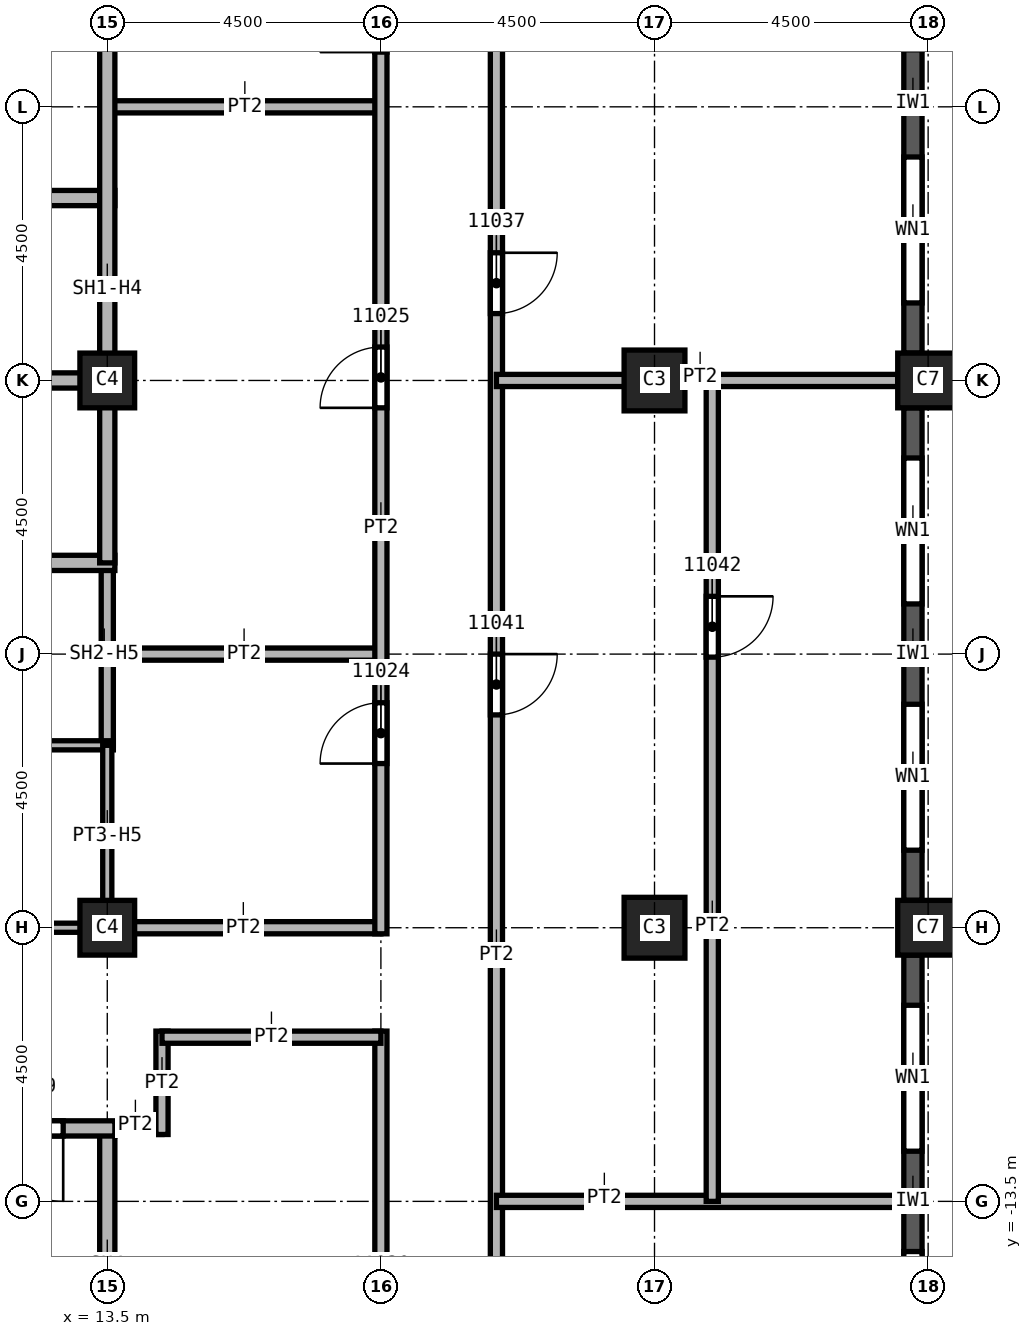
"""IFC4 building model, lengths in metres.
Left out: names, types, materials, properties, quantities, classifications, styles, units other than length and angle.
Written with IfcOpenShell. Run it as: python <this file> out.ifc"""

import sys

from ifc_helpers import new_model, si_unit, direction, frame, frame_2d, origin, origin_2d, place, context, subcontext, project, spatial, rectangle, extrude, element, fill, save


model = new_model("IFC4")
c1 = context("Model", 3, precision=1e-05, world=origin(), true_north=direction((0.0, 1.0)))
c2 = subcontext(c1, "Body", "Model", "MODEL_VIEW")
j1 = project(units=[si_unit("LENGTHUNIT", "METRE"), si_unit("PLANEANGLEUNIT", "RADIAN")], contexts=[c1])
p1 = place(None, origin())
s1 = spatial("IfcSite", under=j1, at=p1, CompositionType="ELEMENT")
p2 = place(p1, origin())
s2 = spatial("IfcBuilding", under=s1, at=p2, CompositionType="ELEMENT")
p3 = place(p2, frame((0.0, 0.0, 188.0)))
s3 = spatial("IfcBuildingStorey", under=s2, at=p3, CompositionType="ELEMENT", Elevation=188.0)
for number, where, z_axis, x_axis in (
    (1, (22.5, 0.0, 0.0), (0.0, 0.0, 1.0), (1.0, 0.0, 0.0)),
    (2, (22.5, -9.0, 0.0), (0.0, 0.0, 1.0), (1.0, 0.0, 0.0)),
):
    element("IfcColumn", number, at=place(p3, frame(where, z_axis=z_axis, x_axis=x_axis)), inside=s3, PredefinedType="COLUMN", context=c2, shape_type="SweptSolid", body=[
        extrude(rectangle(XDim=1.0, YDim=1.0, at=origin_2d()), origin(), (0.0, 0.0, 1.0), 3.72),
    ])
for number, where, z_axis, x_axis in (
    (3, (13.5, 0.0, 0.0), (0.0, 0.0, 1.0), (1.0, 0.0, 0.0)),
    (4, (13.5, -9.0, 0.0), (0.0, 0.0, 1.0), (1.0, 0.0, 0.0)),
):
    element("IfcColumn", number, at=place(p3, frame(where, z_axis=z_axis, x_axis=x_axis)), inside=s3, PredefinedType="COLUMN", context=c2, shape_type="SweptSolid", body=[
        extrude(rectangle(XDim=0.9, YDim=0.9, at=origin_2d()), origin(), (0.0, 0.0, 1.0), 3.72),
    ])
for number, where, z_axis, x_axis in (
    (5, (27.0, 0.0, 0.0), (0.0, 0.0, 1.0), (0.0, 1.0, 0.0)),
    (6, (27.0, -9.0, 0.0), (0.0, 0.0, 1.0), (0.0, 1.0, 0.0)),
):
    element("IfcColumn", number, at=place(p3, frame(where, z_axis=z_axis, x_axis=x_axis)), inside=s3, PredefinedType="COLUMN", context=c2, shape_type="SweptSolid", body=[
        extrude(rectangle(XDim=0.9, YDim=1.0, at=origin_2d()), origin(), (0.0, 0.0, 1.0), 3.72),
    ])
p4 = place(p3, frame((26.75, -17.55, 0.0), z_axis=(0.0, 0.0, 1.0), x_axis=(0.0, 1.0, 0.0)))
e7 = element("IfcWall", 7, at=p4, inside=s3, PredefinedType="SOLIDWALL", context=c2, shape_type="SweptSolid", body=[
    extrude(rectangle(XDim=8.1, YDim=0.3, at=frame_2d((4.05, 0.0))), origin(), (0.0, 0.0, 1.0), 3.12),
])
p5 = place(p4, frame((0.825, 0.0, 0.8)))
e8 = element("IfcOpeningElement", 8, at=p5, cuts=e7, PredefinedType="OPENING", context=c2, shape_type="SweptSolid", body=[
    extrude(rectangle(XDim=2.4, YDim=1.95, at=frame_2d((1.2, 0.975))), frame((0.0, 0.15, 0.0), z_axis=(0.0, -1.0, 0.0), x_axis=(1.0, 0.0, 0.0)), (0.0, 0.0, 1.0), 0.3),
])
p6 = place(p4, frame((4.875, 0.0, 0.8)))
e9 = element("IfcOpeningElement", 9, at=p6, cuts=e7, PredefinedType="OPENING", context=c2, shape_type="SweptSolid", body=[
    extrude(rectangle(XDim=2.4, YDim=1.95, at=frame_2d((1.2, 0.975))), frame((0.0, 0.15, 0.0), z_axis=(0.0, -1.0, 0.0), x_axis=(1.0, 0.0, 0.0)), (0.0, 0.0, 1.0), 0.3),
])
p7 = place(p3, frame((26.75, -8.55, 0.0), z_axis=(0.0, 0.0, 1.0), x_axis=(0.0, 1.0, 0.0)))
e10 = element("IfcWall", 10, at=p7, inside=s3, PredefinedType="SOLIDWALL", context=c2, shape_type="SweptSolid", body=[
    extrude(rectangle(XDim=8.1, YDim=0.3, at=frame_2d((4.05, 0.0))), origin(), (0.0, 0.0, 1.0), 3.12),
])
p8 = place(p7, frame((0.825, 0.0, 0.8)))
e11 = element("IfcOpeningElement", 11, at=p8, cuts=e10, PredefinedType="OPENING", context=c2, shape_type="SweptSolid", body=[
    extrude(rectangle(XDim=2.4, YDim=1.95, at=frame_2d((1.2, 0.975))), frame((0.0, 0.15, 0.0), z_axis=(0.0, -1.0, 0.0), x_axis=(1.0, 0.0, 0.0)), (0.0, 0.0, 1.0), 0.3),
])
p9 = place(p7, frame((4.875, 0.0, 0.8)))
e12 = element("IfcOpeningElement", 12, at=p9, cuts=e10, PredefinedType="OPENING", context=c2, shape_type="SweptSolid", body=[
    extrude(rectangle(XDim=2.4, YDim=1.95, at=frame_2d((1.2, 0.975))), frame((0.0, 0.15, 0.0), z_axis=(0.0, -1.0, 0.0), x_axis=(1.0, 0.0, 0.0)), (0.0, 0.0, 1.0), 0.3),
])
p10 = place(p3, frame((26.75, 0.45, 0.0), z_axis=(0.0, 0.0, 1.0), x_axis=(0.0, 1.0, 0.0)))
e13 = element("IfcWall", 13, at=p10, inside=s3, PredefinedType="SOLIDWALL", context=c2, shape_type="SweptSolid", body=[
    extrude(rectangle(XDim=8.1, YDim=0.3, at=frame_2d((4.05, 0.0))), origin(), (0.0, 0.0, 1.0), 3.12),
])
p11 = place(p10, frame((0.825, 0.0, 0.8)))
e14 = element("IfcOpeningElement", 14, at=p11, cuts=e13, PredefinedType="OPENING", context=c2, shape_type="SweptSolid", body=[
    extrude(rectangle(XDim=2.4, YDim=1.95, at=frame_2d((1.2, 0.975))), frame((0.0, 0.15, 0.0), z_axis=(0.0, -1.0, 0.0), x_axis=(1.0, 0.0, 0.0)), (0.0, 0.0, 1.0), 0.3),
])
p12 = place(p10, frame((4.988, 0.0, 0.8)))
e15 = element("IfcOpeningElement", 15, at=p12, cuts=e13, PredefinedType="OPENING", context=c2, shape_type="SweptSolid", body=[
    extrude(rectangle(XDim=1.0, YDim=1.95, at=frame_2d((0.5, 0.975))), frame((0.0, 0.15, 0.0), z_axis=(0.0, -1.0, 0.0), x_axis=(1.0, 0.0, 0.0)), (0.0, 0.0, 1.0), 0.3),
])
p13 = place(p10, frame((6.587, 0.0, 0.8)))
e16 = element("IfcOpeningElement", 16, at=p13, cuts=e13, PredefinedType="OPENING", context=c2, shape_type="SweptSolid", body=[
    extrude(rectangle(XDim=0.6, YDim=1.95, at=frame_2d((0.3, 0.975))), frame((0.0, 0.15, 0.0), z_axis=(0.0, -1.0, 0.0), x_axis=(1.0, 0.0, 0.0)), (0.0, 0.0, 1.0), 0.3),
])
for number, where, z_axis, x_axis in (
    (17, (13.5, -9.0, 0.0), (0.0, 0.0, 1.0), (1.0, 0.0, 0.0)),
    (18, (13.5, -4.5, 0.0), (0.0, 0.0, 1.0), (1.0, 0.0, 0.0)),
    (19, (13.5, 4.5, 0.0), (0.0, 0.0, 1.0), (1.0, 0.0, 0.0)),
):
    element("IfcWall", number, at=place(p3, frame(where, z_axis=z_axis, x_axis=x_axis)), inside=s3, PredefinedType="PARTITIONING", context=c2, shape_type="SweptSolid", body=[
        extrude(rectangle(XDim=4.5, YDim=0.2, at=frame_2d((2.25, 0.0))), origin(), (0.0, 0.0, 1.0), 3.72),
    ])
p14 = place(p3, frame((14.4, -12.3, 0.0), z_axis=(0.0, 0.0, 1.0), x_axis=(-1.0, 0.0, 0.0)))
e20 = element("IfcWall", 20, at=p14, inside=s3, PredefinedType="PARTITIONING", context=c2, shape_type="SweptSolid", body=[
    extrude(rectangle(XDim=1.025, YDim=0.2, at=frame_2d((0.512, 0.0))), origin(), (0.0, 0.0, 1.0), 3.72),
])
p15 = place(p3, frame((14.4, -10.7, 0.0), z_axis=(0.0, 0.0, 1.0), x_axis=(0.0, -1.0, 0.0)))
e21 = element("IfcWall", 21, at=p15, inside=s3, PredefinedType="PARTITIONING", context=c2, shape_type="SweptSolid", body=[
    extrude(rectangle(XDim=1.7, YDim=0.2, at=frame_2d((0.85, 0.0))), origin(), (0.0, 0.0, 1.0), 3.72),
])
p16 = place(p3, frame((18.0, -22.3, 0.0), z_axis=(0.0, 0.0, 1.0), x_axis=(0.0, 1.0, 0.0)))
e22 = element("IfcWall", 22, at=p16, inside=s3, PredefinedType="PARTITIONING", context=c2, shape_type="SweptSolid", body=[
    extrude(rectangle(XDim=11.6, YDim=0.2, at=frame_2d((5.8, 0.0))), origin(), (0.0, 0.0, 1.0), 3.72),
])
p17 = place(p16, frame((6.25, 0.0, 0.0)))
e23 = element("IfcOpeningElement", 23, at=p17, cuts=e22, PredefinedType="OPENING", context=c2, shape_type="SweptSolid", body=[
    extrude(rectangle(XDim=1.0, YDim=2.1, at=frame_2d((0.5, 1.05))), frame((0.0, 0.1, 0.0), z_axis=(0.0, -1.0, 0.0), x_axis=(1.0, 0.0, 0.0)), (0.0, 0.0, 1.0), 0.2),
])
p18 = place(p3, frame((18.0, -10.8, 0.0), z_axis=(0.0, 0.0, 1.0), x_axis=(-1.0, 0.0, 0.0)))
e24 = element("IfcWall", 24, at=p18, inside=s3, PredefinedType="PARTITIONING", context=c2, shape_type="SweptSolid", body=[
    extrude(rectangle(XDim=3.6, YDim=0.2, at=frame_2d((1.8, 0.0))), origin(), (0.0, 0.0, 1.0), 3.72),
])
p19 = place(p3, frame((18.0, -9.1, 0.0), z_axis=(0.0, 0.0, 1.0), x_axis=(0.0, 1.0, 0.0)))
e25 = element("IfcWall", 25, at=p19, inside=s3, PredefinedType="PARTITIONING", context=c2, shape_type="SweptSolid", body=[
    extrude(rectangle(XDim=18.2, YDim=0.2, at=frame_2d((9.1, 0.0))), origin(), (0.0, 0.0, 1.0), 3.72),
])
p20 = place(p19, frame((2.8, 0.0, 0.0)))
e26 = element("IfcOpeningElement", 26, at=p20, cuts=e25, PredefinedType="OPENING", context=c2, shape_type="SweptSolid", body=[
    extrude(rectangle(XDim=1.0, YDim=2.1, at=frame_2d((0.5, 1.05))), frame((0.0, 0.1, 0.0), z_axis=(0.0, -1.0, 0.0), x_axis=(1.0, 0.0, 0.0)), (0.0, 0.0, 1.0), 0.2),
])
p21 = place(p19, frame((8.65, 0.0, 0.0)))
e27 = element("IfcOpeningElement", 27, at=p21, cuts=e25, PredefinedType="OPENING", context=c2, shape_type="SweptSolid", body=[
    extrude(rectangle(XDim=1.0, YDim=2.1, at=frame_2d((0.5, 1.05))), frame((0.0, 0.1, 0.0), z_axis=(0.0, -1.0, 0.0), x_axis=(1.0, 0.0, 0.0)), (0.0, 0.0, 1.0), 0.2),
])
p22 = place(p19, frame((14.5, 0.0, 0.0)))
e28 = element("IfcOpeningElement", 28, at=p22, cuts=e25, PredefinedType="OPENING", context=c2, shape_type="SweptSolid", body=[
    extrude(rectangle(XDim=1.0, YDim=2.1, at=frame_2d((0.5, 1.05))), frame((0.0, 0.1, 0.0), z_axis=(0.0, -1.0, 0.0), x_axis=(1.0, 0.0, 0.0)), (0.0, 0.0, 1.0), 0.2),
])
p23 = place(p3, frame((19.9, 22.4, 0.0), z_axis=(0.0, 0.0, 1.0), x_axis=(0.0, -1.0, 0.0)))
e29 = element("IfcWall", 29, at=p23, inside=s3, PredefinedType="PARTITIONING", context=c2, shape_type="SweptSolid", body=[
    extrude(rectangle(XDim=44.8, YDim=0.2, at=frame_2d((22.4, 0.0))), origin(), (0.0, 0.0, 1.0), 3.72),
])
p24 = place(p23, frame((20.3, 0.0, 0.0)))
e30 = element("IfcOpeningElement", 30, at=p24, cuts=e29, PredefinedType="OPENING", context=c2, shape_type="SweptSolid", body=[
    extrude(rectangle(XDim=1.0, YDim=2.1, at=frame_2d((0.5, 1.05))), frame((0.0, 0.1, 0.0), z_axis=(0.0, -1.0, 0.0), x_axis=(1.0, 0.0, 0.0)), (0.0, 0.0, 1.0), 0.2),
])
p25 = place(p23, frame((13.85, 0.0, 0.0)))
e31 = element("IfcOpeningElement", 31, at=p25, cuts=e29, PredefinedType="OPENING", context=c2, shape_type="SweptSolid", body=[
    extrude(rectangle(XDim=1.0, YDim=2.1, at=frame_2d((0.5, 1.05))), frame((0.0, 0.1, 0.0), z_axis=(0.0, -1.0, 0.0), x_axis=(1.0, 0.0, 0.0)), (0.0, 0.0, 1.0), 0.2),
])
p26 = place(p23, frame((5.2, 0.0, 0.0)))
e32 = element("IfcOpeningElement", 32, at=p26, cuts=e29, PredefinedType="OPENING", context=c2, shape_type="SweptSolid", body=[
    extrude(rectangle(XDim=1.0, YDim=2.1, at=frame_2d((0.5, 1.05))), frame((0.0, 0.1, 0.0), z_axis=(0.0, -1.0, 0.0), x_axis=(1.0, 0.0, 0.0)), (0.0, 0.0, 1.0), 0.2),
])
p27 = place(p23, frame((40.05, 0.0, 0.0)))
e33 = element("IfcOpeningElement", 33, at=p27, cuts=e29, PredefinedType="OPENING", context=c2, shape_type="SweptSolid", body=[
    extrude(rectangle(XDim=1.0, YDim=2.1, at=frame_2d((0.5, 1.05))), frame((0.0, 0.1, 0.0), z_axis=(0.0, -1.0, 0.0), x_axis=(1.0, 0.0, 0.0)), (0.0, 0.0, 1.0), 0.2),
])
p28 = place(p23, frame((26.9, 0.0, 0.0)))
e34 = element("IfcOpeningElement", 34, at=p28, cuts=e29, PredefinedType="OPENING", context=c2, shape_type="SweptSolid", body=[
    extrude(rectangle(XDim=1.0, YDim=2.1, at=frame_2d((0.5, 1.05))), frame((0.0, 0.1, 0.0), z_axis=(0.0, -1.0, 0.0), x_axis=(1.0, 0.0, 0.0)), (0.0, 0.0, 1.0), 0.2),
])
p29 = place(p3, frame((19.9, -13.5, 0.0), z_axis=(0.0, 0.0, 1.0), x_axis=(1.0, 0.0, 0.0)))
e35 = element("IfcWall", 35, at=p29, inside=s3, PredefinedType="PARTITIONING", context=c2, shape_type="SweptSolid", body=[
    extrude(rectangle(XDim=6.7, YDim=0.2, at=frame_2d((3.35, 0.0))), origin(), (0.0, 0.0, 1.0), 3.72),
])
p30 = place(p3, frame((23.45, 0.0, 0.0), z_axis=(0.0, 0.0, 1.0), x_axis=(0.0, -1.0, 0.0)))
e36 = element("IfcWall", 36, at=p30, inside=s3, PredefinedType="PARTITIONING", context=c2, shape_type="SweptSolid", body=[
    extrude(rectangle(XDim=13.5, YDim=0.2, at=frame_2d((6.75, 0.0))), origin(), (0.0, 0.0, 1.0), 3.72),
])
p31 = place(p30, frame((3.55, 0.0, 0.0)))
e37 = element("IfcOpeningElement", 37, at=p31, cuts=e36, PredefinedType="OPENING", context=c2, shape_type="SweptSolid", body=[
    extrude(rectangle(XDim=1.0, YDim=2.1, at=frame_2d((0.5, 1.05))), frame((0.0, 0.1, 0.0), z_axis=(0.0, -1.0, 0.0), x_axis=(1.0, 0.0, 0.0)), (0.0, 0.0, 1.0), 0.2),
])
p32 = place(p3, frame((26.5, 0.0, 0.0), z_axis=(0.0, 0.0, 1.0), x_axis=(-1.0, 0.0, 0.0)))
e38 = element("IfcWall", 38, at=p32, inside=s3, PredefinedType="PARTITIONING", context=c2, shape_type="SweptSolid", body=[
    extrude(rectangle(XDim=6.6, YDim=0.2, at=frame_2d((3.3, 0.0))), origin(), (0.0, 0.0, 1.0), 3.72),
])
p33 = place(p3, frame((13.5, -3.0, 0.0), z_axis=(0.0, 0.0, 1.0), x_axis=(0.0, -1.0, 0.0)))
e39 = element("IfcWall", 39, at=p33, inside=s3, PredefinedType="SOLIDWALL", context=c2, shape_type="SweptSolid", body=[
    extrude(rectangle(XDim=3.0, YDim=0.2, at=frame_2d((1.5, 0.0))), origin(), (0.0, 0.0, 1.0), 2.958),
])
p34 = place(p3, frame((4.375, -3.0, 0.0), z_axis=(0.0, 0.0, 1.0), x_axis=(1.0, 0.0, 0.0)))
e40 = element("IfcWall", 40, at=p34, inside=s3, PredefinedType="SOLIDWALL", context=c2, shape_type="SweptSolid", body=[
    extrude(rectangle(XDim=9.25, YDim=0.25, at=frame_2d((4.625, 0.0))), origin(), (0.0, 0.0, 1.0), 3.72),
])
p35 = place(p34, frame((4.125, 0.0, 0.0)))
e41 = element("IfcOpeningElement", 41, at=p35, cuts=e40, PredefinedType="OPENING", context=c2, shape_type="SweptSolid", body=[
    extrude(rectangle(XDim=1.1, YDim=2.1, at=frame_2d((0.55, 1.05))), frame((0.0, 0.125, 0.0), z_axis=(0.0, -1.0, 0.0), x_axis=(1.0, 0.0, 0.0)), (0.0, 0.0, 1.0), 0.25),
])
p36 = place(p3, frame((7.5, 3.0, 0.0), z_axis=(0.0, 0.0, 1.0), x_axis=(1.0, 0.0, 0.0)))
e42 = element("IfcWall", 42, at=p36, inside=s3, PredefinedType="SOLIDWALL", context=c2, shape_type="SweptSolid", body=[
    extrude(rectangle(XDim=6.125, YDim=0.25, at=frame_2d((3.062, 0.0))), origin(), (0.0, 0.0, 1.0), 3.72),
])
p37 = place(p36, frame((1.0, 0.0, 0.0)))
e43 = element("IfcOpeningElement", 43, at=p37, cuts=e42, PredefinedType="OPENING", context=c2, shape_type="SweptSolid", body=[
    extrude(rectangle(XDim=1.1, YDim=2.1, at=frame_2d((0.55, 1.05))), frame((0.0, 0.125, 0.0), z_axis=(0.0, -1.0, 0.0), x_axis=(1.0, 0.0, 0.0)), (0.0, 0.0, 1.0), 0.25),
])
p38 = place(p3, frame((10.5, 0.0, 0.0), z_axis=(0.0, 0.0, 1.0), x_axis=(1.0, 0.0, 0.0)))
e44 = element("IfcWall", 44, at=p38, inside=s3, PredefinedType="SOLIDWALL", context=c2, shape_type="SweptSolid", body=[
    extrude(rectangle(XDim=3.125, YDim=0.25, at=frame_2d((1.562, 0.0))), origin(), (0.0, 0.0, 1.0), 3.72),
])
p39 = place(p3, frame((13.5, 6.0, 0.0), z_axis=(0.0, 0.0, 1.0), x_axis=(0.0, -1.0, 0.0)))
e45 = element("IfcWall", 45, at=p39, inside=s3, PredefinedType="SOLIDWALL", context=c2, shape_type="SweptSolid", body=[
    extrude(rectangle(XDim=9.0, YDim=0.25, at=frame_2d((4.5, 0.0))), origin(), (0.0, 0.0, 1.0), 2.958),
])
p40 = place(p3, frame((13.5, -12.3, 0.0), z_axis=(0.0, 0.0, 1.0), x_axis=(0.0, -1.0, 0.0)))
e46 = element("IfcWall", 46, at=p40, inside=s3, PredefinedType="SOLIDWALL", context=c2, shape_type="SweptSolid", body=[
    extrude(rectangle(XDim=4.625, YDim=0.25, at=frame_2d((2.312, 0.0))), origin(), (0.0, 0.0, 1.0), 3.72),
])
p41 = place(p3, frame((13.625, -12.3, 0.0), z_axis=(0.0, 0.0, 1.0), x_axis=(-1.0, 0.0, 0.0)))
e47 = element("IfcWall", 47, at=p41, inside=s3, PredefinedType="SOLIDWALL", context=c2, shape_type="SweptSolid", body=[
    extrude(rectangle(XDim=9.25, YDim=0.25, at=frame_2d((4.625, 0.0))), origin(), (0.0, 0.0, 1.0), 3.72),
])
p42 = place(p41, frame((0.85, 0.0, 0.0)))
e48 = element("IfcOpeningElement", 48, at=p42, cuts=e47, PredefinedType="OPENING", context=c2, shape_type="SweptSolid", body=[
    extrude(rectangle(XDim=1.2, YDim=2.1, at=frame_2d((0.6, 1.05))), frame((0.0, 0.125, 0.0), z_axis=(0.0, -1.0, 0.0), x_axis=(1.0, 0.0, 0.0)), (0.0, 0.0, 1.0), 0.25),
])
p43 = place(p3, frame((10.5, -6.0, 0.0), z_axis=(0.0, 0.0, 1.0), x_axis=(1.0, 0.0, 0.0)))
e49 = element("IfcWall", 49, at=p43, inside=s3, PredefinedType="PARTITIONING", context=c2, shape_type="SweptSolid", body=[
    extrude(rectangle(XDim=3.1, YDim=0.15, at=frame_2d((1.55, 0.0))), origin(), (0.0, 0.0, 1.0), 3.72),
])
p44 = place(p3, frame((13.5, -6.0, 0.0), z_axis=(0.0, 0.0, 1.0), x_axis=(0.0, -1.0, 0.0)))
e50 = element("IfcWall", 50, at=p44, inside=s3, PredefinedType="PARTITIONING", context=c2, shape_type="SweptSolid", body=[
    extrude(rectangle(XDim=3.1, YDim=0.15, at=frame_2d((1.55, 0.0))), origin(), (0.0, 0.0, 1.0), 2.958),
])
p45 = place(p3, frame((13.575, -9.0, 0.0), z_axis=(0.0, 0.0, 1.0), x_axis=(-1.0, 0.0, 0.0)))
e51 = element("IfcWall", 51, at=p45, inside=s3, PredefinedType="PARTITIONING", context=c2, shape_type="SweptSolid", body=[
    extrude(rectangle(XDim=3.075, YDim=0.15, at=frame_2d((1.538, 0.0))), origin(), (0.0, 0.0, 1.0), 2.958),
])
p46 = place(p5, origin())
e52 = element("IfcWindow", 52, at=p46, inside=s3, PartitioningType="SINGLE_PANEL", PredefinedType="WINDOW", context=c2, shape_type="SweptSolid", body=[
    extrude(rectangle(XDim=2.4, YDim=1.95, at=frame_2d((1.2, 0.975))), frame((0.0, 0.03, 0.0), z_axis=(0.0, -1.0, 0.0), x_axis=(1.0, 0.0, 0.0)), (0.0, 0.0, 1.0), 0.06),
])
fill(e8, e52)
p47 = place(p6, origin())
e53 = element("IfcWindow", 53, at=p47, inside=s3, PartitioningType="SINGLE_PANEL", PredefinedType="WINDOW", context=c2, shape_type="SweptSolid", body=[
    extrude(rectangle(XDim=2.4, YDim=1.95, at=frame_2d((1.2, 0.975))), frame((0.0, 0.03, 0.0), z_axis=(0.0, -1.0, 0.0), x_axis=(1.0, 0.0, 0.0)), (0.0, 0.0, 1.0), 0.06),
])
fill(e9, e53)
p48 = place(p8, origin())
e54 = element("IfcWindow", 54, at=p48, inside=s3, PartitioningType="SINGLE_PANEL", PredefinedType="WINDOW", context=c2, shape_type="SweptSolid", body=[
    extrude(rectangle(XDim=2.4, YDim=1.95, at=frame_2d((1.2, 0.975))), frame((0.0, 0.03, 0.0), z_axis=(0.0, -1.0, 0.0), x_axis=(1.0, 0.0, 0.0)), (0.0, 0.0, 1.0), 0.06),
])
fill(e11, e54)
p49 = place(p9, origin())
e55 = element("IfcWindow", 55, at=p49, inside=s3, PartitioningType="SINGLE_PANEL", PredefinedType="WINDOW", context=c2, shape_type="SweptSolid", body=[
    extrude(rectangle(XDim=2.4, YDim=1.95, at=frame_2d((1.2, 0.975))), frame((0.0, 0.03, 0.0), z_axis=(0.0, -1.0, 0.0), x_axis=(1.0, 0.0, 0.0)), (0.0, 0.0, 1.0), 0.06),
])
fill(e12, e55)
p50 = place(p11, origin())
e56 = element("IfcWindow", 56, at=p50, inside=s3, PartitioningType="SINGLE_PANEL", PredefinedType="WINDOW", context=c2, shape_type="SweptSolid", body=[
    extrude(rectangle(XDim=2.4, YDim=1.95, at=frame_2d((1.2, 0.975))), frame((0.0, 0.03, 0.0), z_axis=(0.0, -1.0, 0.0), x_axis=(1.0, 0.0, 0.0)), (0.0, 0.0, 1.0), 0.06),
])
fill(e14, e56)
p51 = place(p42, origin())
e57 = element("IfcDoor", 57, at=p51, inside=s3, OperationType="SINGLE_SWING_RIGHT", PredefinedType="DOOR", context=c2, shape_type="SweptSolid", body=[
    extrude(rectangle(XDim=1.2, YDim=2.1, at=frame_2d((0.6, 1.05))), frame((0.0, 0.025, 0.0), z_axis=(0.0, -1.0, 0.0), x_axis=(1.0, 0.0, 0.0)), (0.0, 0.0, 1.0), 0.05),
])
fill(e48, e57)
p52 = place(p20, origin())
e58 = element("IfcDoor", 58, at=p52, inside=s3, OperationType="SINGLE_SWING_LEFT", PredefinedType="DOOR", context=c2, shape_type="SweptSolid", body=[
    extrude(rectangle(XDim=1.0, YDim=2.1, at=frame_2d((0.5, 1.05))), frame((0.0, 0.025, 0.0), z_axis=(0.0, -1.0, 0.0), x_axis=(1.0, 0.0, 0.0)), (0.0, 0.0, 1.0), 0.05),
])
fill(e26, e58)
p53 = place(p21, origin())
e59 = element("IfcDoor", 59, at=p53, inside=s3, OperationType="SINGLE_SWING_RIGHT", PredefinedType="DOOR", context=c2, shape_type="SweptSolid", body=[
    extrude(rectangle(XDim=1.0, YDim=2.1, at=frame_2d((0.5, 1.05))), frame((0.0, 0.025, 0.0), z_axis=(0.0, -1.0, 0.0), x_axis=(1.0, 0.0, 0.0)), (0.0, 0.0, 1.0), 0.05),
])
fill(e27, e59)
p54 = place(p24, origin())
e60 = element("IfcDoor", 60, at=p54, inside=s3, OperationType="SINGLE_SWING_RIGHT", PredefinedType="DOOR", context=c2, shape_type="SweptSolid", body=[
    extrude(rectangle(XDim=1.0, YDim=2.1, at=frame_2d((0.5, 1.05))), frame((0.0, 0.025, 0.0), z_axis=(0.0, -1.0, 0.0), x_axis=(1.0, 0.0, 0.0)), (0.0, 0.0, 1.0), 0.05),
])
fill(e30, e60)
p55 = place(p28, origin())
e61 = element("IfcDoor", 61, at=p55, inside=s3, OperationType="SINGLE_SWING_RIGHT", PredefinedType="DOOR", context=c2, shape_type="SweptSolid", body=[
    extrude(rectangle(XDim=1.0, YDim=2.1, at=frame_2d((0.5, 1.05))), frame((0.0, 0.025, 0.0), z_axis=(0.0, -1.0, 0.0), x_axis=(1.0, 0.0, 0.0)), (0.0, 0.0, 1.0), 0.05),
])
fill(e34, e61)
p56 = place(p31, origin())
e62 = element("IfcDoor", 62, at=p56, inside=s3, OperationType="SINGLE_SWING_LEFT", PredefinedType="DOOR", context=c2, shape_type="SweptSolid", body=[
    extrude(rectangle(XDim=1.0, YDim=2.1, at=frame_2d((0.5, 1.05))), frame((0.0, 0.025, 0.0), z_axis=(0.0, -1.0, 0.0), x_axis=(1.0, 0.0, 0.0)), (0.0, 0.0, 1.0), 0.05),
])
fill(e37, e62)
save(model, sys.argv[1])
